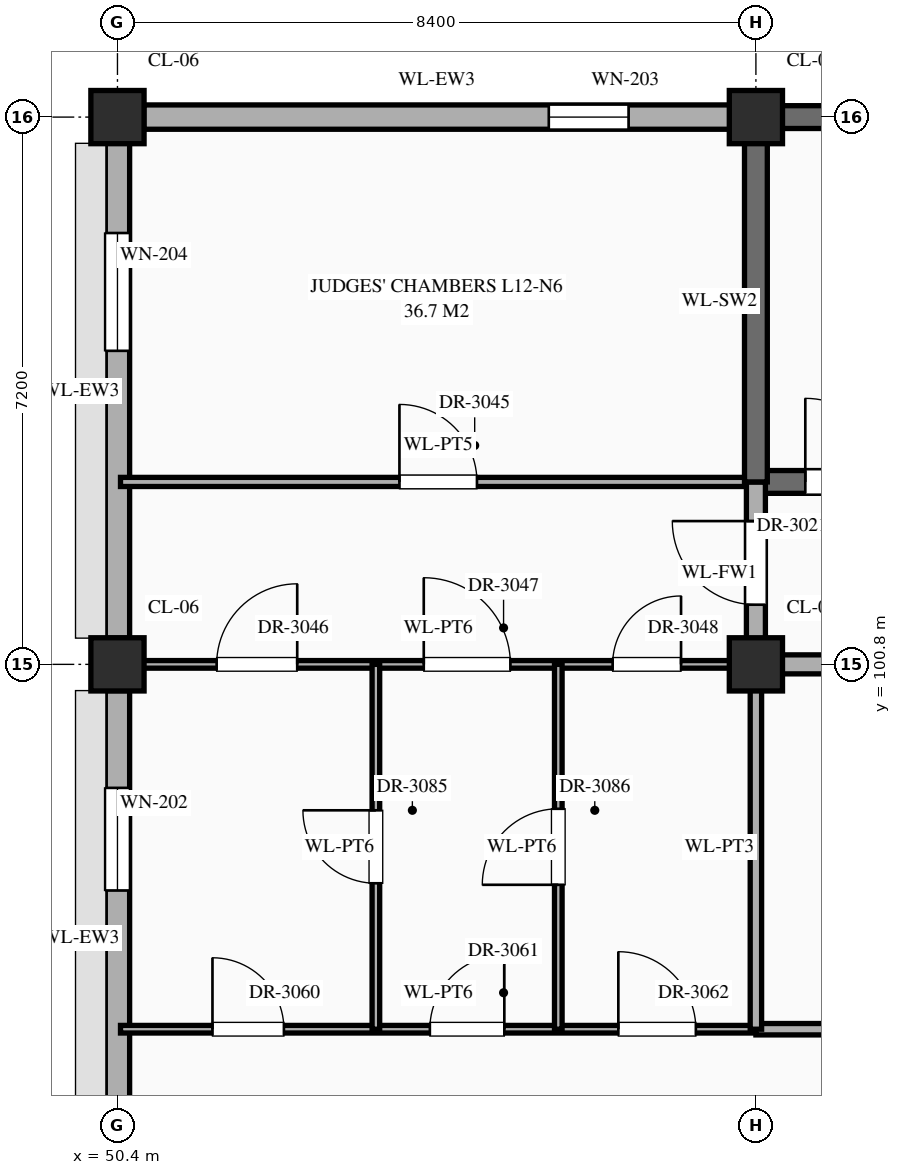
"""IFC4 building model, lengths in metres.
Left out: names, types, materials, properties, quantities, classifications, styles, units other than length and angle.
Written with IfcOpenShell. Run it as: python <this file> out.ifc"""

import sys

from ifc_helpers import new_model, si_unit, direction, frame, frame_2d, origin, origin_2d, place, context, subcontext, project, spatial, rectangle, extrude, element, fill, save


model = new_model("IFC4")
c1 = context("Model", 3, precision=1e-05, world=origin(), true_north=direction((0.0, 1.0)))
c2 = subcontext(c1, "Body", "Model", "MODEL_VIEW")
j1 = project(units=[si_unit("LENGTHUNIT", "METRE"), si_unit("PLANEANGLEUNIT", "RADIAN")], contexts=[c1])
p1 = place(None, origin())
s1 = spatial("IfcSite", under=j1, at=p1, CompositionType="ELEMENT")
p2 = place(p1, origin())
s2 = spatial("IfcBuilding", under=s1, at=p2, CompositionType="ELEMENT")
p3 = place(p2, frame((0.0, 0.0, 51.9)))
s3 = spatial("IfcBuildingStorey", under=s2, at=p3, CompositionType="ELEMENT", Elevation=51.9)
for number, where, z_axis, x_axis in (
    (1, (50.4, 100.8, 0.0), (0.0, 0.0, 1.0), (1.0, 0.0, 0.0)),
    (2, (50.4, 108.0, 0.0), (0.0, 0.0, 1.0), (1.0, 0.0, 0.0)),
    (3, (58.8, 100.8, 0.0), (0.0, 0.0, 1.0), (1.0, 0.0, 0.0)),
    (4, (58.8, 108.0, 0.0), (0.0, 0.0, 1.0), (1.0, 0.0, 0.0)),
):
    element("IfcColumn", number, at=place(p3, frame(where, z_axis=z_axis, x_axis=x_axis)), inside=s3, PredefinedType="COLUMN", context=c2, shape_type="SweptSolid", body=[
        extrude(rectangle(XDim=0.7, YDim=0.7, at=origin_2d()), origin(), (0.0, 0.0, 1.0), 4.2),
    ])
p4 = place(p3, frame((50.4, 93.945, 0.0), z_axis=(0.0, 0.0, 1.0), x_axis=(0.0, 1.0, 0.0)))
e5 = element("IfcWall", 5, at=p4, inside=s3, PredefinedType="STANDARD", context=c2, shape_type="SweptSolid", body=[
    extrude(rectangle(XDim=6.51, YDim=0.32, at=frame_2d((3.255, 0.0))), origin(), (0.0, 0.0, 1.0), 3.31),
])
p5 = place(p4, frame((3.88, 0.0, 0.55)))
e6 = element("IfcOpeningElement", 6, at=p5, cuts=e5, PredefinedType="OPENING", context=c2, shape_type="SweptSolid", body=[
    extrude(rectangle(XDim=1.35, YDim=2.12, at=frame_2d((0.675, 1.06))), frame((0.0, 0.172, 0.0), z_axis=(0.0, -1.0, 0.0), x_axis=(1.0, 0.0, 0.0)), (0.0, 0.0, 1.0), 0.344),
])
p6 = place(p3, frame((50.745, 108.0, 0.0), z_axis=(0.0, 0.0, 1.0), x_axis=(1.0, 0.0, 0.0)))
e7 = element("IfcWall", 7, at=p6, inside=s3, PredefinedType="STANDARD", context=c2, shape_type="SweptSolid", body=[
    extrude(rectangle(XDim=7.71, YDim=0.32, at=frame_2d((3.855, 0.0))), origin(), (0.0, 0.0, 1.0), 3.31),
])
p7 = place(p6, frame((5.33, 0.0, 0.55)))
e8 = element("IfcOpeningElement", 8, at=p7, cuts=e7, PredefinedType="OPENING", context=c2, shape_type="SweptSolid", body=[
    extrude(rectangle(XDim=1.05, YDim=1.2, at=frame_2d((0.525, 0.6))), frame((0.0, 0.172, 0.0), z_axis=(0.0, -1.0, 0.0), x_axis=(1.0, 0.0, 0.0)), (0.0, 0.0, 1.0), 0.344),
])
p8 = place(p3, frame((50.4, 101.145, 0.0), z_axis=(0.0, 0.0, 1.0), x_axis=(0.0, 1.0, 0.0)))
e9 = element("IfcWall", 9, at=p8, inside=s3, PredefinedType="STANDARD", context=c2, shape_type="SweptSolid", body=[
    extrude(rectangle(XDim=6.51, YDim=0.32, at=frame_2d((3.255, 0.0))), origin(), (0.0, 0.0, 1.0), 3.31),
])
p9 = place(p8, frame((3.78, 0.0, 0.55)))
e10 = element("IfcOpeningElement", 10, at=p9, cuts=e9, PredefinedType="OPENING", context=c2, shape_type="SweptSolid", body=[
    extrude(rectangle(XDim=1.55, YDim=1.2, at=frame_2d((0.775, 0.6))), frame((0.0, 0.172, 0.0), z_axis=(0.0, -1.0, 0.0), x_axis=(1.0, 0.0, 0.0)), (0.0, 0.0, 1.0), 0.344),
])
p10 = place(p3, frame((59.145, 108.0, 0.0), z_axis=(0.0, 0.0, 1.0), x_axis=(1.0, 0.0, 0.0)))
e11 = element("IfcWall", 11, at=p10, inside=s3, PredefinedType="SHEAR", context=c2, shape_type="SweptSolid", body=[
    extrude(rectangle(XDim=7.71, YDim=0.3, at=frame_2d((3.855, 0.0))), origin(), (0.0, 0.0, 1.0), 3.96),
])
p11 = place(p3, frame((50.44, 96.0, 0.0), z_axis=(0.0, 0.0, 1.0), x_axis=(1.0, 0.0, 0.0)))
e12 = element("IfcWall", 12, at=p11, inside=s3, PredefinedType="STANDARD", context=c2, shape_type="SweptSolid", body=[
    extrude(rectangle(XDim=8.36, YDim=0.1, at=frame_2d((4.18, 0.0))), origin(), (0.0, 0.0, 1.0), 3.96),
])
p12 = place(p11, frame((1.21, 0.0, 0.0)))
e13 = element("IfcOpeningElement", 13, at=p12, cuts=e12, PredefinedType="OPENING", context=c2, shape_type="SweptSolid", body=[
    extrude(rectangle(XDim=0.94, YDim=2.3, at=frame_2d((0.47, 1.15))), frame((0.0, 0.062, 0.0), z_axis=(0.0, -1.0, 0.0), x_axis=(1.0, 0.0, 0.0)), (0.0, 0.0, 1.0), 0.124),
])
p13 = place(p11, frame((4.07, 0.0, 0.0)))
e14 = element("IfcOpeningElement", 14, at=p13, cuts=e12, PredefinedType="OPENING", context=c2, shape_type="SweptSolid", body=[
    extrude(rectangle(XDim=0.98, YDim=2.35, at=frame_2d((0.49, 1.175))), frame((0.0, 0.062, 0.0), z_axis=(0.0, -1.0, 0.0), x_axis=(1.0, 0.0, 0.0)), (0.0, 0.0, 1.0), 0.124),
])
p14 = place(p11, frame((6.55, 0.0, 0.0)))
e15 = element("IfcOpeningElement", 15, at=p14, cuts=e12, PredefinedType="OPENING", context=c2, shape_type="SweptSolid", body=[
    extrude(rectangle(XDim=1.02, YDim=2.4, at=frame_2d((0.51, 1.2))), frame((0.0, 0.062, 0.0), z_axis=(0.0, -1.0, 0.0), x_axis=(1.0, 0.0, 0.0)), (0.0, 0.0, 1.0), 0.124),
])
p15 = place(p3, frame((58.8, 96.0, 0.0), z_axis=(0.0, 0.0, 1.0), x_axis=(1.0, 0.0, 0.0)))
e16 = element("IfcWall", 16, at=p15, inside=s3, PredefinedType="STANDARD", context=c2, shape_type="SweptSolid", body=[
    extrude(rectangle(XDim=25.2, YDim=0.15, at=frame_2d((12.6, 0.0))), origin(), (0.0, 0.0, 1.0), 3.96),
])
p16 = place(p15, frame((3.67, 0.0, 0.0)))
e17 = element("IfcOpeningElement", 17, at=p16, cuts=e16, PredefinedType="OPENING", context=c2, shape_type="SweptSolid", body=[
    extrude(rectangle(XDim=1.06, YDim=2.4, at=frame_2d((0.53, 1.2))), frame((0.0, 0.087, 0.0), z_axis=(0.0, -1.0, 0.0), x_axis=(1.0, 0.0, 0.0)), (0.0, 0.0, 1.0), 0.174),
])
p17 = place(p15, frame((12.03, 0.0, 0.0)))
e18 = element("IfcOpeningElement", 18, at=p17, cuts=e16, PredefinedType="OPENING", context=c2, shape_type="SweptSolid", body=[
    extrude(rectangle(XDim=1.14, YDim=2.4, at=frame_2d((0.57, 1.2))), frame((0.0, 0.087, 0.0), z_axis=(0.0, -1.0, 0.0), x_axis=(1.0, 0.0, 0.0)), (0.0, 0.0, 1.0), 0.174),
])
p18 = place(p15, frame((20.55, 0.0, 0.0)))
e19 = element("IfcOpeningElement", 19, at=p18, cuts=e16, PredefinedType="OPENING", context=c2, shape_type="SweptSolid", body=[
    extrude(rectangle(XDim=0.9, YDim=2.15, at=frame_2d((0.45, 1.075))), frame((0.0, 0.087, 0.0), z_axis=(0.0, -1.0, 0.0), x_axis=(1.0, 0.0, 0.0)), (0.0, 0.0, 1.0), 0.174),
])
p19 = place(p3, frame((50.44, 100.8, 0.0), z_axis=(0.0, 0.0, 1.0), x_axis=(1.0, 0.0, 0.0)))
e20 = element("IfcWall", 20, at=p19, inside=s3, PredefinedType="STANDARD", context=c2, shape_type="SweptSolid", body=[
    extrude(rectangle(XDim=8.36, YDim=0.1, at=frame_2d((4.18, 0.0))), origin(), (0.0, 0.0, 1.0), 3.11),
])
p20 = place(p19, frame((1.265, 0.0, 0.0)))
e21 = element("IfcOpeningElement", 21, at=p20, cuts=e20, PredefinedType="OPENING", context=c2, shape_type="SweptSolid", body=[
    extrude(rectangle(XDim=1.06, YDim=2.4, at=frame_2d((0.53, 1.2))), frame((0.0, 0.062, 0.0), z_axis=(0.0, -1.0, 0.0), x_axis=(1.0, 0.0, 0.0)), (0.0, 0.0, 1.0), 0.124),
])
p21 = place(p19, frame((3.99, 0.0, 0.0)))
e22 = element("IfcOpeningElement", 22, at=p21, cuts=e20, PredefinedType="OPENING", context=c2, shape_type="SweptSolid", body=[
    extrude(rectangle(XDim=1.14, YDim=2.4, at=frame_2d((0.57, 1.2))), frame((0.0, 0.062, 0.0), z_axis=(0.0, -1.0, 0.0), x_axis=(1.0, 0.0, 0.0)), (0.0, 0.0, 1.0), 0.124),
])
p22 = place(p19, frame((6.475, 0.0, 0.0)))
e23 = element("IfcOpeningElement", 23, at=p22, cuts=e20, PredefinedType="OPENING", context=c2, shape_type="SweptSolid", body=[
    extrude(rectangle(XDim=0.9, YDim=2.15, at=frame_2d((0.45, 1.075))), frame((0.0, 0.062, 0.0), z_axis=(0.0, -1.0, 0.0), x_axis=(1.0, 0.0, 0.0)), (0.0, 0.0, 1.0), 0.124),
])
p23 = place(p3, frame((58.8, 100.8, 0.0), z_axis=(0.0, 0.0, 1.0), x_axis=(1.0, 0.0, 0.0)))
e24 = element("IfcWall", 24, at=p23, inside=s3, PredefinedType="STANDARD", context=c2, shape_type="SweptSolid", body=[
    extrude(rectangle(XDim=12.6, YDim=0.25, at=frame_2d((6.3, 0.0))), origin(), (0.0, 0.0, 1.0), 3.11),
])
p24 = place(p23, frame((3.7, 0.0, 0.0)))
e25 = element("IfcOpeningElement", 25, at=p24, cuts=e24, PredefinedType="OPENING", context=c2, shape_type="SweptSolid", body=[
    extrude(rectangle(XDim=1.0, YDim=2.2, at=frame_2d((0.5, 1.1))), frame((0.0, 0.137, 0.0), z_axis=(0.0, -1.0, 0.0), x_axis=(1.0, 0.0, 0.0)), (0.0, 0.0, 1.0), 0.274),
])
p25 = place(p3, frame((50.44, 103.2, 0.0), z_axis=(0.0, 0.0, 1.0), x_axis=(1.0, 0.0, 0.0)))
e26 = element("IfcWall", 26, at=p25, inside=s3, PredefinedType="STANDARD", context=c2, shape_type="SweptSolid", body=[
    extrude(rectangle(XDim=8.36, YDim=0.12, at=frame_2d((4.18, 0.0))), origin(), (0.0, 0.0, 1.0), 3.96),
])
p26 = place(p25, frame((3.67, 0.0, 0.0)))
e27 = element("IfcOpeningElement", 27, at=p26, cuts=e26, PredefinedType="OPENING", context=c2, shape_type="SweptSolid", body=[
    extrude(rectangle(XDim=1.02, YDim=2.4, at=frame_2d((0.51, 1.2))), frame((0.0, 0.072, 0.0), z_axis=(0.0, -1.0, 0.0), x_axis=(1.0, 0.0, 0.0)), (0.0, 0.0, 1.0), 0.144),
])
p27 = place(p3, frame((58.8, 103.2, 0.0), z_axis=(0.0, 0.0, 1.0), x_axis=(1.0, 0.0, 0.0)))
e28 = element("IfcWall", 28, at=p27, inside=s3, PredefinedType="SHEAR", context=c2, shape_type="SweptSolid", body=[
    extrude(rectangle(XDim=8.4, YDim=0.3, at=frame_2d((4.2, 0.0))), origin(), (0.0, 0.0, 1.0), 3.96),
])
p28 = place(p27, frame((0.65, 0.0, 0.0)))
e29 = element("IfcOpeningElement", 29, at=p28, cuts=e28, PredefinedType="OPENING", context=c2, shape_type="SweptSolid", body=[
    extrude(rectangle(XDim=1.1, YDim=2.2, at=frame_2d((0.55, 1.1))), frame((0.0, 0.162, 0.0), z_axis=(0.0, -1.0, 0.0), x_axis=(1.0, 0.0, 0.0)), (0.0, 0.0, 1.0), 0.324),
])
p29 = place(p3, frame((53.8, 96.0, 0.0), z_axis=(0.0, 0.0, 1.0), x_axis=(0.0, 1.0, 0.0)))
e30 = element("IfcWall", 30, at=p29, inside=s3, PredefinedType="STANDARD", context=c2, shape_type="SweptSolid", body=[
    extrude(rectangle(XDim=4.8, YDim=0.1, at=frame_2d((2.4, 0.0))), origin(), (0.0, 0.0, 1.0), 3.96),
])
p30 = place(p29, frame((1.92, 0.0, 0.0)))
e31 = element("IfcOpeningElement", 31, at=p30, cuts=e30, PredefinedType="OPENING", context=c2, shape_type="SweptSolid", body=[
    extrude(rectangle(XDim=0.96, YDim=2.2, at=frame_2d((0.48, 1.1))), frame((0.0, 0.062, 0.0), z_axis=(0.0, -1.0, 0.0), x_axis=(1.0, 0.0, 0.0)), (0.0, 0.0, 1.0), 0.124),
])
p31 = place(p3, frame((56.2, 96.0, 0.0), z_axis=(0.0, 0.0, 1.0), x_axis=(0.0, 1.0, 0.0)))
e32 = element("IfcWall", 32, at=p31, inside=s3, PredefinedType="STANDARD", context=c2, shape_type="SweptSolid", body=[
    extrude(rectangle(XDim=4.8, YDim=0.1, at=frame_2d((2.4, 0.0))), origin(), (0.0, 0.0, 1.0), 3.96),
])
p32 = place(p31, frame((1.9, 0.0, 0.0)))
e33 = element("IfcOpeningElement", 33, at=p32, cuts=e32, PredefinedType="OPENING", context=c2, shape_type="SweptSolid", body=[
    extrude(rectangle(XDim=1.0, YDim=2.25, at=frame_2d((0.5, 1.125))), frame((0.0, 0.062, 0.0), z_axis=(0.0, -1.0, 0.0), x_axis=(1.0, 0.0, 0.0)), (0.0, 0.0, 1.0), 0.124),
])
p33 = place(p3, frame((58.8, 96.0, 0.0), z_axis=(0.0, 0.0, 1.0), x_axis=(0.0, 1.0, 0.0)))
e34 = element("IfcWall", 34, at=p33, inside=s3, PredefinedType="STANDARD", context=c2, shape_type="SweptSolid", body=[
    extrude(rectangle(XDim=4.8, YDim=0.15, at=frame_2d((2.4, 0.0))), origin(), (0.0, 0.0, 1.0), 3.21),
])
p34 = place(p3, frame((58.8, 100.8, 0.0), z_axis=(0.0, 0.0, 1.0), x_axis=(0.0, 1.0, 0.0)))
e35 = element("IfcWall", 35, at=p34, inside=s3, PredefinedType="STANDARD", context=c2, shape_type="SweptSolid", body=[
    extrude(rectangle(XDim=2.4, YDim=0.25, at=frame_2d((1.2, 0.0))), origin(), (0.0, 0.0, 1.0), 3.21),
])
p35 = place(p34, frame((0.785, 0.0, 0.0)))
e36 = element("IfcOpeningElement", 36, at=p35, cuts=e35, PredefinedType="OPENING", context=c2, shape_type="SweptSolid", body=[
    extrude(rectangle(XDim=1.1, YDim=2.2, at=frame_2d((0.55, 1.1))), frame((0.0, 0.137, 0.0), z_axis=(0.0, -1.0, 0.0), x_axis=(1.0, 0.0, 0.0)), (0.0, 0.0, 1.0), 0.274),
])
p36 = place(p3, frame((58.8, 103.2, 0.0), z_axis=(0.0, 0.0, 1.0), x_axis=(0.0, 1.0, 0.0)))
e37 = element("IfcWall", 37, at=p36, inside=s3, PredefinedType="SHEAR", context=c2, shape_type="SweptSolid", body=[
    extrude(rectangle(XDim=4.76, YDim=0.3, at=frame_2d((2.38, 0.0))), origin(), (0.0, 0.0, 1.0), 3.96),
])
p37 = place(p5, origin())
e38 = element("IfcWindow", 38, at=p37, inside=s3, PartitioningType="SINGLE_PANEL", PredefinedType="WINDOW", context=c2, shape_type="SweptSolid", body=[
    extrude(rectangle(XDim=1.35, YDim=2.12, at=frame_2d((0.675, 1.06))), frame((0.0, 0.03, 0.0), z_axis=(0.0, -1.0, 0.0), x_axis=(1.0, 0.0, 0.0)), (0.0, 0.0, 1.0), 0.06),
])
fill(e6, e38)
p38 = place(p7, origin())
e39 = element("IfcWindow", 39, at=p38, inside=s3, PartitioningType="SINGLE_PANEL", PredefinedType="WINDOW", context=c2, shape_type="SweptSolid", body=[
    extrude(rectangle(XDim=1.05, YDim=1.2, at=frame_2d((0.525, 0.6))), frame((0.0, 0.03, 0.0), z_axis=(0.0, -1.0, 0.0), x_axis=(1.0, 0.0, 0.0)), (0.0, 0.0, 1.0), 0.06),
])
fill(e8, e39)
p39 = place(p9, origin())
e40 = element("IfcWindow", 40, at=p39, inside=s3, PartitioningType="SINGLE_PANEL", PredefinedType="WINDOW", context=c2, shape_type="SweptSolid", body=[
    extrude(rectangle(XDim=1.55, YDim=1.2, at=frame_2d((0.775, 0.6))), frame((0.0, 0.03, 0.0), z_axis=(0.0, -1.0, 0.0), x_axis=(1.0, 0.0, 0.0)), (0.0, 0.0, 1.0), 0.06),
])
fill(e10, e40)
p40 = place(p28, origin())
e41 = element("IfcDoor", 41, at=p40, inside=s3, OperationType="SINGLE_SWING_LEFT", PredefinedType="DOOR", context=c2, shape_type="SweptSolid", body=[
    extrude(rectangle(XDim=1.1, YDim=2.2, at=frame_2d((0.55, 1.1))), frame((0.0, 0.025, 0.0), z_axis=(0.0, -1.0, 0.0), x_axis=(1.0, 0.0, 0.0)), (0.0, 0.0, 1.0), 0.05),
])
fill(e29, e41)
p41 = place(p35, origin())
e42 = element("IfcDoor", 42, at=p41, inside=s3, OperationType="SINGLE_SWING_RIGHT", PredefinedType="DOOR", context=c2, shape_type="SweptSolid", body=[
    extrude(rectangle(XDim=1.1, YDim=2.2, at=frame_2d((0.55, 1.1))), frame((0.0, 0.025, 0.0), z_axis=(0.0, -1.0, 0.0), x_axis=(1.0, 0.0, 0.0)), (0.0, 0.0, 1.0), 0.05),
])
fill(e36, e42)
p42 = place(p26, origin())
e43 = element("IfcDoor", 43, at=p42, inside=s3, OperationType="SINGLE_SWING_LEFT", PredefinedType="DOOR", context=c2, shape_type="SweptSolid", body=[
    extrude(rectangle(XDim=1.02, YDim=2.4, at=frame_2d((0.51, 1.2))), frame((0.0, 0.025, 0.0), z_axis=(0.0, -1.0, 0.0), x_axis=(1.0, 0.0, 0.0)), (0.0, 0.0, 1.0), 0.05),
])
fill(e27, e43)
p43 = place(p20, origin())
e44 = element("IfcDoor", 44, at=p43, inside=s3, OperationType="SINGLE_SWING_RIGHT", PredefinedType="DOOR", context=c2, shape_type="SweptSolid", body=[
    extrude(rectangle(XDim=1.06, YDim=2.4, at=frame_2d((0.53, 1.2))), frame((0.0, 0.025, 0.0), z_axis=(0.0, -1.0, 0.0), x_axis=(1.0, 0.0, 0.0)), (0.0, 0.0, 1.0), 0.05),
])
fill(e21, e44)
p44 = place(p21, origin())
e45 = element("IfcDoor", 45, at=p44, inside=s3, OperationType="SINGLE_SWING_LEFT", PredefinedType="DOOR", context=c2, shape_type="SweptSolid", body=[
    extrude(rectangle(XDim=1.14, YDim=2.4, at=frame_2d((0.57, 1.2))), frame((0.0, 0.025, 0.0), z_axis=(0.0, -1.0, 0.0), x_axis=(1.0, 0.0, 0.0)), (0.0, 0.0, 1.0), 0.05),
])
fill(e22, e45)
p45 = place(p22, origin())
e46 = element("IfcDoor", 46, at=p45, inside=s3, OperationType="SINGLE_SWING_RIGHT", PredefinedType="DOOR", context=c2, shape_type="SweptSolid", body=[
    extrude(rectangle(XDim=0.9, YDim=2.15, at=frame_2d((0.45, 1.075))), frame((0.0, 0.025, 0.0), z_axis=(0.0, -1.0, 0.0), x_axis=(1.0, 0.0, 0.0)), (0.0, 0.0, 1.0), 0.05),
])
fill(e23, e46)
p46 = place(p12, origin())
e47 = element("IfcDoor", 47, at=p46, inside=s3, OperationType="SINGLE_SWING_LEFT", PredefinedType="DOOR", context=c2, shape_type="SweptSolid", body=[
    extrude(rectangle(XDim=0.94, YDim=2.3, at=frame_2d((0.47, 1.15))), frame((0.0, 0.025, 0.0), z_axis=(0.0, -1.0, 0.0), x_axis=(1.0, 0.0, 0.0)), (0.0, 0.0, 1.0), 0.05),
])
fill(e13, e47)
p47 = place(p13, origin())
e48 = element("IfcDoor", 48, at=p47, inside=s3, OperationType="SINGLE_SWING_RIGHT", PredefinedType="DOOR", context=c2, shape_type="SweptSolid", body=[
    extrude(rectangle(XDim=0.98, YDim=2.35, at=frame_2d((0.49, 1.175))), frame((0.0, 0.025, 0.0), z_axis=(0.0, -1.0, 0.0), x_axis=(1.0, 0.0, 0.0)), (0.0, 0.0, 1.0), 0.05),
])
fill(e14, e48)
p48 = place(p14, origin())
e49 = element("IfcDoor", 49, at=p48, inside=s3, OperationType="SINGLE_SWING_LEFT", PredefinedType="DOOR", context=c2, shape_type="SweptSolid", body=[
    extrude(rectangle(XDim=1.02, YDim=2.4, at=frame_2d((0.51, 1.2))), frame((0.0, 0.025, 0.0), z_axis=(0.0, -1.0, 0.0), x_axis=(1.0, 0.0, 0.0)), (0.0, 0.0, 1.0), 0.05),
])
fill(e15, e49)
p49 = place(p30, origin())
e50 = element("IfcDoor", 50, at=p49, inside=s3, OperationType="SINGLE_SWING_RIGHT", PredefinedType="DOOR", context=c2, shape_type="SweptSolid", body=[
    extrude(rectangle(XDim=0.96, YDim=2.2, at=frame_2d((0.48, 1.1))), frame((0.0, 0.025, 0.0), z_axis=(0.0, -1.0, 0.0), x_axis=(1.0, 0.0, 0.0)), (0.0, 0.0, 1.0), 0.05),
])
fill(e31, e50)
p50 = place(p32, origin())
e51 = element("IfcDoor", 51, at=p50, inside=s3, OperationType="SINGLE_SWING_LEFT", PredefinedType="DOOR", context=c2, shape_type="SweptSolid", body=[
    extrude(rectangle(XDim=1.0, YDim=2.25, at=frame_2d((0.5, 1.125))), frame((0.0, 0.025, 0.0), z_axis=(0.0, -1.0, 0.0), x_axis=(1.0, 0.0, 0.0)), (0.0, 0.0, 1.0), 0.05),
])
fill(e33, e51)
save(model, sys.argv[1])
